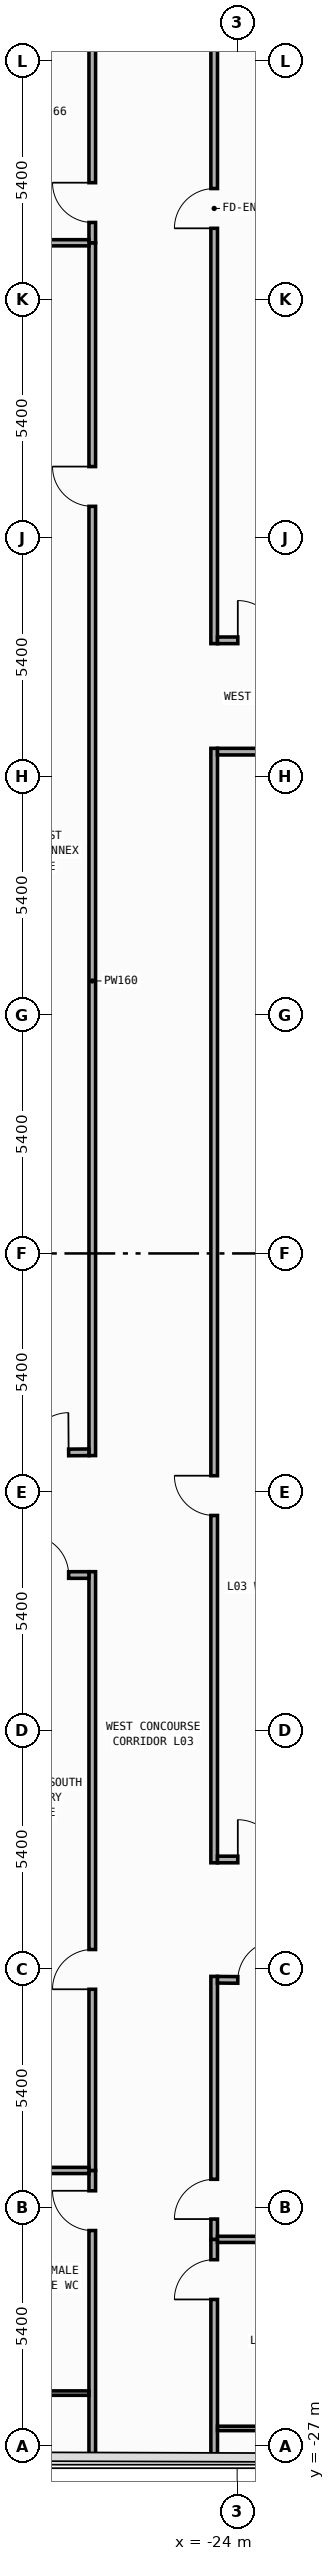
"""IFC4 building model, lengths in metres.
Left out: names, types, materials, properties, quantities, classifications, styles, units other than length and angle.
Written with IfcOpenShell. Run it as: python <this file> out.ifc"""

import sys

from ifc_helpers import new_model, si_unit, direction, frame, frame_2d, origin, place, context, subcontext, project, spatial, rectangle, extrude, element, fill, save


model = new_model("IFC4")
c1 = context("Model", 3, precision=1e-05, world=origin(), true_north=direction((0.0, 1.0)))
c2 = subcontext(c1, "Body", "Model", "MODEL_VIEW")
j1 = project(units=[si_unit("LENGTHUNIT", "METRE"), si_unit("PLANEANGLEUNIT", "RADIAN")], contexts=[c1])
p1 = place(None, origin())
s1 = spatial("IfcSite", under=j1, at=p1, CompositionType="ELEMENT")
p2 = place(p1, origin())
s2 = spatial("IfcBuilding", under=s1, at=p2, CompositionType="ELEMENT")
p3 = place(p2, frame((0.0, 0.0, 11.0)))
s3 = spatial("IfcBuildingStorey", under=s2, at=p3, CompositionType="ELEMENT", Elevation=11.0)
p4 = place(p3, frame((-24.52, 13.805, 0.0), z_axis=(0.0, 0.0, 1.0), x_axis=(0.0, 1.0, 0.0)))
e1 = element("IfcWall", 1, at=p4, inside=s3, PredefinedType="PARTITIONING", context=c2, shape_type="SweptSolid", body=[
    extrude(rectangle(XDim=13.608, YDim=0.15, at=frame_2d((6.804, 0.0))), origin(), (0.0, 0.0, 1.0), 4.7),
])
p5 = place(p4, frame((9.402, 0.0, 0.0)))
e2 = element("IfcOpeningElement", 2, at=p5, cuts=e1, PredefinedType="OPENING", context=c2, shape_type="SweptSolid", body=[
    extrude(rectangle(XDim=0.9, YDim=2.15, at=frame_2d((0.45, 1.075))), frame((0.0, 0.085, 0.0), z_axis=(0.0, -1.0, 0.0), x_axis=(1.0, 0.0, 0.0)), (0.0, 0.0, 1.0), 0.17),
])
p6 = place(p3, frame((-27.28, -27.249, 0.0), z_axis=(0.0, 0.0, 1.0), x_axis=(0.0, 1.0, 0.0)))
e3 = element("IfcWall", 3, at=p6, inside=s3, PredefinedType="PARTITIONING", context=c2, shape_type="SweptSolid", body=[
    extrude(rectangle(XDim=6.489, YDim=0.15, at=frame_2d((3.245, 0.0))), origin(), (0.0, 0.0, 1.0), 4.7),
])
p7 = place(p6, frame((5.129, 0.0, 0.0)))
e4 = element("IfcOpeningElement", 4, at=p7, cuts=e3, PredefinedType="OPENING", context=c2, shape_type="SweptSolid", body=[
    extrude(rectangle(XDim=0.9, YDim=2.15, at=frame_2d((0.45, 1.075))), frame((0.0, 0.085, 0.0), z_axis=(0.0, -1.0, 0.0), x_axis=(1.0, 0.0, 0.0)), (0.0, 0.0, 1.0), 0.17),
])
p8 = place(p3, frame((-24.52, -27.258, 0.0), z_axis=(0.0, 0.0, 1.0), x_axis=(0.0, 1.0, 0.0)))
e5 = element("IfcWall", 5, at=p8, inside=s3, PredefinedType="PARTITIONING", context=c2, shape_type="SweptSolid", body=[
    extrude(rectangle(XDim=4.938, YDim=0.15, at=frame_2d((2.469, 0.0))), origin(), (0.0, 0.0, 1.0), 4.7),
])
p9 = place(p8, frame((3.578, 0.0, 0.0)))
e6 = element("IfcOpeningElement", 6, at=p9, cuts=e5, PredefinedType="OPENING", context=c2, shape_type="SweptSolid", body=[
    extrude(rectangle(XDim=0.9, YDim=2.15, at=frame_2d((0.45, 1.075))), frame((0.0, 0.085, 0.0), z_axis=(0.0, -1.0, 0.0), x_axis=(1.0, 0.0, 0.0)), (0.0, 0.0, 1.0), 0.17),
])
p10 = place(p3, frame((-24.52, -13.795, 0.0), z_axis=(0.0, 0.0, 1.0), x_axis=(0.0, 1.0, 0.0)))
e7 = element("IfcWall", 7, at=p10, inside=s3, PredefinedType="PARTITIONING", context=c2, shape_type="SweptSolid", body=[
    extrude(rectangle(XDim=25.23, YDim=0.15, at=frame_2d((12.615, 0.0))), origin(), (0.0, 0.0, 1.0), 4.7),
])
p11 = place(p10, frame((7.863, 0.0, 0.0)))
e8 = element("IfcOpeningElement", 8, at=p11, cuts=e7, PredefinedType="OPENING", context=c2, shape_type="SweptSolid", body=[
    extrude(rectangle(XDim=0.9, YDim=2.15, at=frame_2d((0.45, 1.075))), frame((0.0, 0.085, 0.0), z_axis=(0.0, -1.0, 0.0), x_axis=(1.0, 0.0, 0.0)), (0.0, 0.0, 1.0), 0.17),
])
p12 = place(p3, frame((-27.28, -20.76, 0.0), z_axis=(0.0, 0.0, 1.0), x_axis=(0.0, 1.0, 0.0)))
e9 = element("IfcWall", 9, at=p12, inside=s3, PredefinedType="PARTITIONING", context=c2, shape_type="SweptSolid", body=[
    extrude(rectangle(XDim=13.555, YDim=0.15, at=frame_2d((6.777, 0.0))), origin(), (0.0, 0.0, 1.0), 4.7),
])
p13 = place(p12, frame((4.102, 0.0, 0.0)))
e10 = element("IfcOpeningElement", 10, at=p13, cuts=e9, PredefinedType="OPENING", context=c2, shape_type="SweptSolid", body=[
    extrude(rectangle(XDim=0.9, YDim=2.15, at=frame_2d((0.45, 1.075))), frame((0.0, 0.085, 0.0), z_axis=(0.0, -1.0, 0.0), x_axis=(1.0, 0.0, 0.0)), (0.0, 0.0, 1.0), 0.17),
])
p14 = place(p3, frame((-27.28, -4.576, 0.0), z_axis=(0.0, 0.0, 1.0), x_axis=(0.0, 1.0, 0.0)))
e11 = element("IfcWall", 11, at=p14, inside=s3, PredefinedType="PARTITIONING", context=c2, shape_type="SweptSolid", body=[
    extrude(rectangle(XDim=27.456, YDim=0.15, at=frame_2d((13.728, 0.0))), origin(), (0.0, 0.0, 1.0), 4.7),
])
p15 = place(p14, frame((21.49, 0.0, 0.0)))
e12 = element("IfcOpeningElement", 12, at=p15, cuts=e11, PredefinedType="OPENING", context=c2, shape_type="SweptSolid", body=[
    extrude(rectangle(XDim=0.9, YDim=2.15, at=frame_2d((0.45, 1.075))), frame((0.0, 0.085, 0.0), z_axis=(0.0, -1.0, 0.0), x_axis=(1.0, 0.0, 0.0)), (0.0, 0.0, 1.0), 0.17),
])
p16 = place(p3, frame((-24.52, -22.32, 0.0), z_axis=(0.0, 0.0, 1.0), x_axis=(0.0, 1.0, 0.0)))
e13 = element("IfcWall", 13, at=p16, inside=s3, PredefinedType="PARTITIONING", context=c2, shape_type="SweptSolid", body=[
    extrude(rectangle(XDim=5.954, YDim=0.15, at=frame_2d((2.977, 0.0))), origin(), (0.0, 0.0, 1.0), 4.7),
])
p17 = place(p16, frame((0.46, 0.0, 0.0)))
e14 = element("IfcOpeningElement", 14, at=p17, cuts=e13, PredefinedType="OPENING", context=c2, shape_type="SweptSolid", body=[
    extrude(rectangle(XDim=0.9, YDim=2.15, at=frame_2d((0.45, 1.075))), frame((0.0, 0.085, 0.0), z_axis=(0.0, -1.0, 0.0), x_axis=(1.0, 0.0, 0.0)), (0.0, 0.0, 1.0), 0.17),
])
p18 = place(p3, frame((-27.28, 22.88, 0.0), z_axis=(0.0, 0.0, 1.0), x_axis=(0.0, 1.0, 0.0)))
e15 = element("IfcWall", 15, at=p18, inside=s3, PredefinedType="PARTITIONING", context=c2, shape_type="SweptSolid", body=[
    extrude(rectangle(XDim=4.542, YDim=0.15, at=frame_2d((2.271, 0.0))), origin(), (0.0, 0.0, 1.0), 4.7),
])
p19 = place(p18, frame((0.46, 0.0, 0.0)))
e16 = element("IfcOpeningElement", 16, at=p19, cuts=e15, PredefinedType="OPENING", context=c2, shape_type="SweptSolid", body=[
    extrude(rectangle(XDim=0.9, YDim=2.15, at=frame_2d((0.45, 1.075))), frame((0.0, 0.085, 0.0), z_axis=(0.0, -1.0, 0.0), x_axis=(1.0, 0.0, 0.0)), (0.0, 0.0, 1.0), 0.17),
])
p20 = place(p3, frame((-24.445, -13.72, 0.0), z_axis=(0.0, 0.0, 1.0), x_axis=(1.0, 0.0, 0.0)))
e17 = element("IfcWall", 17, at=p20, inside=s3, PredefinedType="PARTITIONING", context=c2, shape_type="SweptSolid", body=[
    extrude(rectangle(XDim=4.135, YDim=0.15, at=frame_2d((2.067, 0.0))), origin(), (0.0, 0.0, 1.0), 4.7),
])
p21 = place(p20, frame((0.46, 0.0, 0.0)))
e18 = element("IfcOpeningElement", 18, at=p21, cuts=e17, PredefinedType="OPENING", context=c2, shape_type="SweptSolid", body=[
    extrude(rectangle(XDim=0.9, YDim=2.15, at=frame_2d((0.45, 1.075))), frame((0.0, 0.085, 0.0), z_axis=(0.0, -1.0, 0.0), x_axis=(1.0, 0.0, 0.0)), (0.0, 0.0, 1.0), 0.17),
])
p22 = place(p3, frame((-24.445, -16.442, 0.0), z_axis=(0.0, 0.0, 1.0), x_axis=(0.999954573497, -0.009531576096, 0.0)))
e19 = element("IfcWall", 19, at=p22, inside=s3, PredefinedType="PARTITIONING", context=c2, shape_type="SweptSolid", body=[
    extrude(rectangle(XDim=3.97, YDim=0.15, at=frame_2d((1.985, 0.0))), origin(), (0.0, 0.0, 1.0), 4.7),
])
p23 = place(p22, frame((0.46, 0.0, 0.0)))
e20 = element("IfcOpeningElement", 20, at=p23, cuts=e19, PredefinedType="OPENING", context=c2, shape_type="SweptSolid", body=[
    extrude(rectangle(XDim=0.9, YDim=2.15, at=frame_2d((0.45, 1.075))), frame((0.0, 0.085, 0.0), z_axis=(0.0, -1.0, 0.0), x_axis=(1.0, 0.0, 0.0)), (0.0, 0.0, 1.0), 0.17),
])
p24 = place(p3, frame((-24.445, 13.88, 0.0), z_axis=(0.0, 0.0, 1.0), x_axis=(1.0, 0.0, 0.0)))
e21 = element("IfcWall", 21, at=p24, inside=s3, PredefinedType="PARTITIONING", context=c2, shape_type="SweptSolid", body=[
    extrude(rectangle(XDim=10.165, YDim=0.15, at=frame_2d((5.083, 0.0))), origin(), (0.0, 0.0, 1.0), 4.7),
])
p25 = place(p24, frame((0.46, 0.0, 0.0)))
e22 = element("IfcOpeningElement", 22, at=p25, cuts=e21, PredefinedType="OPENING", context=c2, shape_type="SweptSolid", body=[
    extrude(rectangle(XDim=0.9, YDim=2.15, at=frame_2d((0.45, 1.075))), frame((0.0, 0.085, 0.0), z_axis=(0.0, -1.0, 0.0), x_axis=(1.0, 0.0, 0.0)), (0.0, 0.0, 1.0), 0.17),
])
p26 = place(p3, frame((-24.445, 11.36, 0.0), z_axis=(0.0, 0.0, 1.0), x_axis=(1.0, 0.0, 0.0)))
e23 = element("IfcWall", 23, at=p26, inside=s3, PredefinedType="PARTITIONING", context=c2, shape_type="SweptSolid", body=[
    extrude(rectangle(XDim=4.045, YDim=0.15, at=frame_2d((2.022, 0.0))), origin(), (0.0, 0.0, 1.0), 4.7),
])
p27 = place(p3, frame((-30.04, -7.28, 0.0), z_axis=(0.0, 0.0, 1.0), x_axis=(1.0, 0.0, 0.0)))
e24 = element("IfcWall", 24, at=p27, inside=s3, PredefinedType="PARTITIONING", context=c2, shape_type="SweptSolid", body=[
    extrude(rectangle(XDim=2.685, YDim=0.15, at=frame_2d((1.343, 0.0))), origin(), (0.0, 0.0, 1.0), 4.7),
])
p28 = place(p27, frame((1.325, 0.0, 0.0)))
e25 = element("IfcOpeningElement", 25, at=p28, cuts=e24, PredefinedType="OPENING", context=c2, shape_type="SweptSolid", body=[
    extrude(rectangle(XDim=0.9, YDim=2.15, at=frame_2d((0.45, 1.075))), frame((0.0, 0.085, 0.0), z_axis=(0.0, -1.0, 0.0), x_axis=(1.0, 0.0, 0.0)), (0.0, 0.0, 1.0), 0.17),
])
p29 = place(p3, frame((-29.88, -4.52, 0.0), z_axis=(0.0, 0.0, 1.0), x_axis=(0.999973705414, 0.007251791521, 0.0)))
e26 = element("IfcWall", 26, at=p29, inside=s3, PredefinedType="PARTITIONING", context=c2, shape_type="SweptSolid", body=[
    extrude(rectangle(XDim=2.525, YDim=0.15, at=frame_2d((1.262, 0.0))), origin(), (0.0, 0.0, 1.0), 4.7),
])
p30 = place(p29, frame((1.165, 0.0, 0.0)))
e27 = element("IfcOpeningElement", 27, at=p30, cuts=e26, PredefinedType="OPENING", context=c2, shape_type="SweptSolid", body=[
    extrude(rectangle(XDim=0.9, YDim=2.15, at=frame_2d((0.45, 1.075))), frame((0.0, 0.085, 0.0), z_axis=(0.0, -1.0, 0.0), x_axis=(1.0, 0.0, 0.0)), (0.0, 0.0, 1.0), 0.17),
])
p31 = place(p3, frame((-29.81, -20.76, 0.0), z_axis=(0.0, 0.0, 1.0), x_axis=(1.0, 0.0, 0.0)))
e28 = element("IfcWall", 28, at=p31, inside=s3, PredefinedType="PARTITIONING", context=c2, shape_type="SweptSolid", body=[
    extrude(rectangle(XDim=2.455, YDim=0.14, at=frame_2d((1.228, 0.0))), origin(), (0.0, 0.0, 1.0), 4.7),
])
p32 = place(p3, frame((-24.445, -22.32, 0.0), z_axis=(0.0, 0.0, 1.0), x_axis=(1.0, 0.0, 0.0)))
e29 = element("IfcWall", 29, at=p32, inside=s3, PredefinedType="PARTITIONING", context=c2, shape_type="SweptSolid", body=[
    extrude(rectangle(XDim=2.395, YDim=0.14, at=frame_2d((1.198, 0.0))), origin(), (0.0, 0.0, 1.0), 4.7),
])
p33 = place(p3, frame((-29.81, 22.88, 0.0), z_axis=(0.0, 0.0, 1.0), x_axis=(1.0, 0.0, 0.0)))
e30 = element("IfcWall", 30, at=p33, inside=s3, PredefinedType="PARTITIONING", context=c2, shape_type="SweptSolid", body=[
    extrude(rectangle(XDim=2.455, YDim=0.14, at=frame_2d((1.228, 0.0))), origin(), (0.0, 0.0, 1.0), 4.7),
])
p34 = place(p3, frame((-27.355, -25.8, 0.0), z_axis=(0.0, 0.0, 1.0), x_axis=(-1.0, 0.0, 0.0)))
e31 = element("IfcWall", 31, at=p34, inside=s3, PredefinedType="PARTITIONING", context=c2, shape_type="SweptSolid", body=[
    extrude(rectangle(XDim=2.455, YDim=0.1, at=frame_2d((1.228, 0.0))), origin(), (0.0, 0.0, 1.0), 4.7),
])
p35 = place(p3, frame((-22.05, -26.6, 0.0), z_axis=(0.0, 0.0, 1.0), x_axis=(-1.0, 0.0, 0.0)))
e32 = element("IfcWall", 32, at=p35, inside=s3, PredefinedType="PARTITIONING", context=c2, shape_type="SweptSolid", body=[
    extrude(rectangle(XDim=2.395, YDim=0.1, at=frame_2d((1.198, 0.0))), origin(), (0.0, 0.0, 1.0), 4.7),
])
p36 = place(p5, origin())
e33 = element("IfcDoor", 33, at=p36, inside=s3, OperationType="SINGLE_SWING_LEFT", PredefinedType="DOOR", context=c2, shape_type="SweptSolid", body=[
    extrude(rectangle(XDim=0.9, YDim=2.15, at=frame_2d((0.45, 1.075))), frame((0.0, 0.025, 0.0), z_axis=(0.0, -1.0, 0.0), x_axis=(1.0, 0.0, 0.0)), (0.0, 0.0, 1.0), 0.05),
])
fill(e2, e33)
p37 = place(p7, origin())
e34 = element("IfcDoor", 34, at=p37, inside=s3, OperationType="SINGLE_SWING_RIGHT", PredefinedType="DOOR", context=c2, shape_type="SweptSolid", body=[
    extrude(rectangle(XDim=0.9, YDim=2.15, at=frame_2d((0.45, 1.075))), frame((0.0, 0.025, 0.0), z_axis=(0.0, -1.0, 0.0), x_axis=(1.0, 0.0, 0.0)), (0.0, 0.0, 1.0), 0.05),
])
fill(e4, e34)
p38 = place(p9, origin())
e35 = element("IfcDoor", 35, at=p38, inside=s3, OperationType="SINGLE_SWING_LEFT", PredefinedType="DOOR", context=c2, shape_type="SweptSolid", body=[
    extrude(rectangle(XDim=0.9, YDim=2.15, at=frame_2d((0.45, 1.075))), frame((0.0, 0.025, 0.0), z_axis=(0.0, -1.0, 0.0), x_axis=(1.0, 0.0, 0.0)), (0.0, 0.0, 1.0), 0.05),
])
fill(e6, e35)
p39 = place(p11, origin())
e36 = element("IfcDoor", 36, at=p39, inside=s3, OperationType="SINGLE_SWING_RIGHT", PredefinedType="DOOR", context=c2, shape_type="SweptSolid", body=[
    extrude(rectangle(XDim=0.9, YDim=2.15, at=frame_2d((0.45, 1.075))), frame((0.0, 0.025, 0.0), z_axis=(0.0, -1.0, 0.0), x_axis=(1.0, 0.0, 0.0)), (0.0, 0.0, 1.0), 0.05),
])
fill(e8, e36)
p40 = place(p13, origin())
e37 = element("IfcDoor", 37, at=p40, inside=s3, OperationType="SINGLE_SWING_LEFT", PredefinedType="DOOR", context=c2, shape_type="SweptSolid", body=[
    extrude(rectangle(XDim=0.9, YDim=2.15, at=frame_2d((0.45, 1.075))), frame((0.0, 0.025, 0.0), z_axis=(0.0, -1.0, 0.0), x_axis=(1.0, 0.0, 0.0)), (0.0, 0.0, 1.0), 0.05),
])
fill(e10, e37)
p41 = place(p15, origin())
e38 = element("IfcDoor", 38, at=p41, inside=s3, OperationType="SINGLE_SWING_RIGHT", PredefinedType="DOOR", context=c2, shape_type="SweptSolid", body=[
    extrude(rectangle(XDim=0.9, YDim=2.15, at=frame_2d((0.45, 1.075))), frame((0.0, 0.025, 0.0), z_axis=(0.0, -1.0, 0.0), x_axis=(1.0, 0.0, 0.0)), (0.0, 0.0, 1.0), 0.05),
])
fill(e12, e38)
p42 = place(p17, origin())
e39 = element("IfcDoor", 39, at=p42, inside=s3, OperationType="SINGLE_SWING_LEFT", PredefinedType="DOOR", context=c2, shape_type="SweptSolid", body=[
    extrude(rectangle(XDim=0.9, YDim=2.15, at=frame_2d((0.45, 1.075))), frame((0.0, 0.025, 0.0), z_axis=(0.0, -1.0, 0.0), x_axis=(1.0, 0.0, 0.0)), (0.0, 0.0, 1.0), 0.05),
])
fill(e14, e39)
p43 = place(p19, origin())
e40 = element("IfcDoor", 40, at=p43, inside=s3, OperationType="SINGLE_SWING_RIGHT", PredefinedType="DOOR", context=c2, shape_type="SweptSolid", body=[
    extrude(rectangle(XDim=0.9, YDim=2.15, at=frame_2d((0.45, 1.075))), frame((0.0, 0.025, 0.0), z_axis=(0.0, -1.0, 0.0), x_axis=(1.0, 0.0, 0.0)), (0.0, 0.0, 1.0), 0.05),
])
fill(e16, e40)
p44 = place(p21, origin())
e41 = element("IfcDoor", 41, at=p44, inside=s3, OperationType="SINGLE_SWING_LEFT", PredefinedType="DOOR", context=c2, shape_type="SweptSolid", body=[
    extrude(rectangle(XDim=0.9, YDim=2.15, at=frame_2d((0.45, 1.075))), frame((0.0, 0.025, 0.0), z_axis=(0.0, -1.0, 0.0), x_axis=(1.0, 0.0, 0.0)), (0.0, 0.0, 1.0), 0.05),
])
fill(e18, e41)
p45 = place(p23, origin())
e42 = element("IfcDoor", 42, at=p45, inside=s3, OperationType="SINGLE_SWING_RIGHT", PredefinedType="DOOR", context=c2, shape_type="SweptSolid", body=[
    extrude(rectangle(XDim=0.9, YDim=2.15, at=frame_2d((0.45, 1.075))), frame((0.0, 0.025, 0.0), z_axis=(0.0, -1.0, 0.0), x_axis=(1.0, 0.0, 0.0)), (0.0, 0.0, 1.0), 0.05),
])
fill(e20, e42)
p46 = place(p25, origin())
e43 = element("IfcDoor", 43, at=p46, inside=s3, OperationType="SINGLE_SWING_LEFT", PredefinedType="DOOR", context=c2, shape_type="SweptSolid", body=[
    extrude(rectangle(XDim=0.9, YDim=2.15, at=frame_2d((0.45, 1.075))), frame((0.0, 0.025, 0.0), z_axis=(0.0, -1.0, 0.0), x_axis=(1.0, 0.0, 0.0)), (0.0, 0.0, 1.0), 0.05),
])
fill(e22, e43)
p47 = place(p28, origin())
e44 = element("IfcDoor", 44, at=p47, inside=s3, OperationType="SINGLE_SWING_LEFT", PredefinedType="DOOR", context=c2, shape_type="SweptSolid", body=[
    extrude(rectangle(XDim=0.9, YDim=2.15, at=frame_2d((0.45, 1.075))), frame((0.0, 0.025, 0.0), z_axis=(0.0, -1.0, 0.0), x_axis=(1.0, 0.0, 0.0)), (0.0, 0.0, 1.0), 0.05),
])
fill(e25, e44)
p48 = place(p30, origin())
e45 = element("IfcDoor", 45, at=p48, inside=s3, OperationType="SINGLE_SWING_RIGHT", PredefinedType="DOOR", context=c2, shape_type="SweptSolid", body=[
    extrude(rectangle(XDim=0.9, YDim=2.15, at=frame_2d((0.45, 1.075))), frame((0.0, 0.025, 0.0), z_axis=(0.0, -1.0, 0.0), x_axis=(1.0, 0.0, 0.0)), (0.0, 0.0, 1.0), 0.05),
])
fill(e27, e45)
save(model, sys.argv[1])
